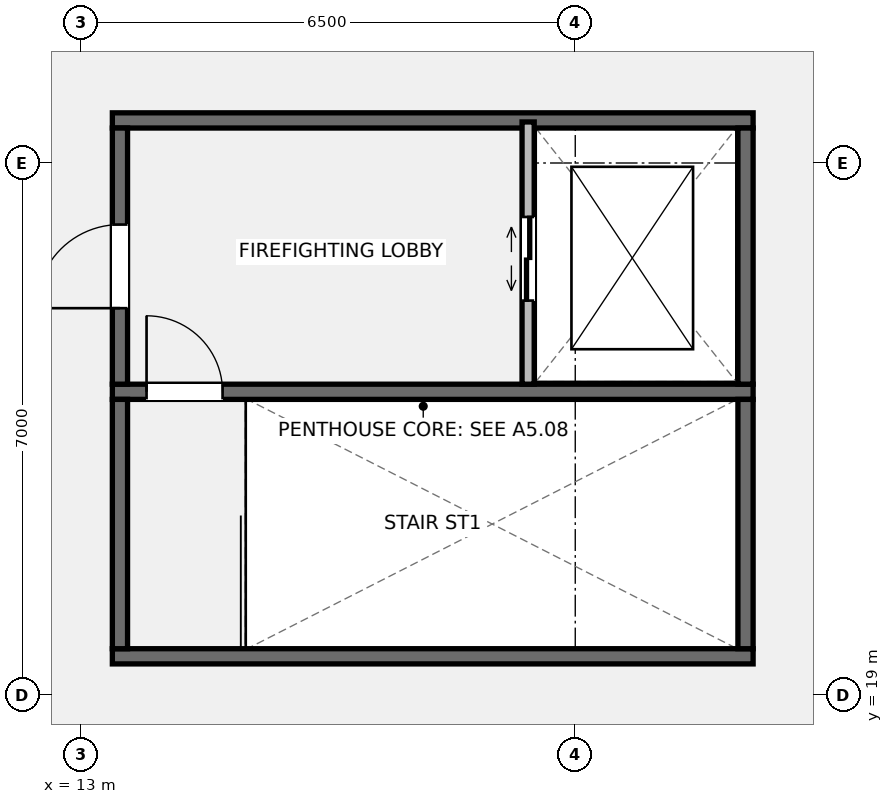
"""IFC4 building model, lengths in metres.
Left out: names, types, materials, properties, quantities, classifications, styles, units other than length and angle.
Written with IfcOpenShell. Run it as: python <this file> out.ifc"""

import sys

from ifc_helpers import new_model, si_unit, direction, frame, frame_2d, origin, place, context, subcontext, project, spatial, rectangle, extrude, element, fill, save


model = new_model("IFC4")
c1 = context("Model", 3, precision=1e-05, world=origin(), true_north=direction((0.0, 1.0)))
c2 = subcontext(c1, "Body", "Model", "MODEL_VIEW")
j1 = project(units=[si_unit("LENGTHUNIT", "METRE"), si_unit("PLANEANGLEUNIT", "RADIAN")], contexts=[c1])
p1 = place(None, origin())
s1 = spatial("IfcSite", under=j1, at=p1, CompositionType="ELEMENT")
p2 = place(p1, origin())
s2 = spatial("IfcBuilding", under=s1, at=p2, CompositionType="ELEMENT")
p3 = place(p2, frame((0.0, 0.0, 320.4)))
s3 = spatial("IfcBuildingStorey", under=s2, at=p3, CompositionType="ELEMENT", Elevation=320.4)
p4 = place(p3, frame((13.41, 19.51, 0.0), z_axis=(0.0, 0.0, 1.0), x_axis=(1.0, 0.0, 0.0)))
e1 = element("IfcWall", 1, at=p4, inside=s3, PredefinedType="SHEAR", context=c2, shape_type="SweptSolid", body=[
    extrude(rectangle(XDim=8.43, YDim=0.2, at=frame_2d((4.215, 0.0))), origin(), (0.0, 0.0, 1.0), 3.2),
])
p5 = place(p3, frame((13.41, 22.99, 0.0), z_axis=(0.0, 0.0, 1.0), x_axis=(1.0, 0.0, 0.0)))
e2 = element("IfcWall", 2, at=p5, inside=s3, PredefinedType="SHEAR", context=c2, shape_type="SweptSolid", body=[
    extrude(rectangle(XDim=8.43, YDim=0.2, at=frame_2d((4.215, 0.0))), origin(), (0.0, 0.0, 1.0), 3.2),
])
p6 = place(p5, frame((0.45, 0.0, 0.0)))
e3 = element("IfcOpeningElement", 3, at=p6, cuts=e2, PredefinedType="OPENING", context=c2, shape_type="SweptSolid", body=[
    extrude(rectangle(XDim=1.0, YDim=2.15, at=frame_2d((0.5, 1.075))), frame((0.0, 0.11, 0.0), z_axis=(0.0, -1.0, 0.0), x_axis=(1.0, 0.0, 0.0)), (0.0, 0.0, 1.0), 0.22),
])
for number, where, z_axis, x_axis in (
    (4, (13.51, 19.61, 0.0), (0.0, 0.0, 1.0), (0.0, 1.0, 0.0)),
    (5, (21.74, 19.61, 0.0), (0.0, 0.0, 1.0), (0.0, 1.0, 0.0)),
):
    element("IfcWall", number, at=place(p3, frame(where, z_axis=z_axis, x_axis=x_axis)), inside=s3, PredefinedType="SHEAR", context=c2, shape_type="SweptSolid", body=[
        extrude(rectangle(XDim=3.28, YDim=0.2, at=frame_2d((1.64, 0.0))), origin(), (0.0, 0.0, 1.0), 3.2),
    ])
p7 = place(p3, frame((13.41, 26.56, 0.0), z_axis=(0.0, 0.0, 1.0), x_axis=(1.0, 0.0, 0.0)))
e6 = element("IfcWall", 6, at=p7, inside=s3, PredefinedType="SHEAR", context=c2, shape_type="SweptSolid", body=[
    extrude(rectangle(XDim=8.43, YDim=0.2, at=frame_2d((4.215, 0.0))), origin(), (0.0, 0.0, 1.0), 3.2),
])
p8 = place(p3, frame((13.51, 23.09, 0.0), z_axis=(0.0, 0.0, 1.0), x_axis=(0.0, 1.0, 0.0)))
e7 = element("IfcWall", 7, at=p8, inside=s3, PredefinedType="SHEAR", context=c2, shape_type="SweptSolid", body=[
    extrude(rectangle(XDim=3.37, YDim=0.2, at=frame_2d((1.685, 0.0))), origin(), (0.0, 0.0, 1.0), 3.2),
])
p9 = place(p8, frame((1.0, 0.0, 0.0)))
e8 = element("IfcOpeningElement", 8, at=p9, cuts=e7, PredefinedType="OPENING", context=c2, shape_type="SweptSolid", body=[
    extrude(rectangle(XDim=1.1, YDim=2.2, at=frame_2d((0.55, 1.1))), frame((0.0, 0.11, 0.0), z_axis=(0.0, -1.0, 0.0), x_axis=(1.0, 0.0, 0.0)), (0.0, 0.0, 1.0), 0.22),
])
p10 = place(p3, frame((21.74, 23.09, 0.0), z_axis=(0.0, 0.0, 1.0), x_axis=(0.0, 1.0, 0.0)))
e9 = element("IfcWall", 9, at=p10, inside=s3, PredefinedType="SHEAR", context=c2, shape_type="SweptSolid", body=[
    extrude(rectangle(XDim=3.37, YDim=0.2, at=frame_2d((1.685, 0.0))), origin(), (0.0, 0.0, 1.0), 3.2),
])
p11 = place(p3, frame((18.88, 23.09, 0.0), z_axis=(0.0, 0.0, 1.0), x_axis=(0.0, 1.0, 0.0)))
e10 = element("IfcWall", 10, at=p11, inside=s3, PredefinedType="STANDARD", context=c2, shape_type="SweptSolid", body=[
    extrude(rectangle(XDim=3.45, YDim=0.16, at=frame_2d((1.725, 0.0))), origin(), (0.0, 0.0, 1.0), 3.16),
])
p12 = place(p11, frame((1.1, 0.0, 0.0)))
e11 = element("IfcOpeningElement", 11, at=p12, cuts=e10, PredefinedType="OPENING", context=c2, shape_type="SweptSolid", body=[
    extrude(rectangle(XDim=1.1, YDim=2.2, at=frame_2d((0.55, 1.1))), frame((0.0, 0.09, 0.0), z_axis=(0.0, -1.0, 0.0), x_axis=(1.0, 0.0, 0.0)), (0.0, 0.0, 1.0), 0.18),
])
p13 = place(p9, origin())
e12 = element("IfcDoor", 12, at=p13, inside=s3, OperationType="SINGLE_SWING_LEFT", PredefinedType="DOOR", context=c2, shape_type="SweptSolid", body=[
    extrude(rectangle(XDim=1.1, YDim=2.2, at=frame_2d((0.55, 1.1))), frame((0.0, 0.025, 0.0), z_axis=(0.0, -1.0, 0.0), x_axis=(1.0, 0.0, 0.0)), (0.0, 0.0, 1.0), 0.05),
])
fill(e8, e12)
p14 = place(p6, origin())
e13 = element("IfcDoor", 13, at=p14, inside=s3, OperationType="SINGLE_SWING_LEFT", PredefinedType="DOOR", context=c2, shape_type="SweptSolid", body=[
    extrude(rectangle(XDim=1.0, YDim=2.15, at=frame_2d((0.5, 1.075))), frame((0.0, 0.025, 0.0), z_axis=(0.0, -1.0, 0.0), x_axis=(1.0, 0.0, 0.0)), (0.0, 0.0, 1.0), 0.05),
])
fill(e3, e13)
p15 = place(p12, origin())
e14 = element("IfcDoor", 14, at=p15, inside=s3, OperationType="DOUBLE_DOOR_SLIDING", PredefinedType="DOOR", context=c2, shape_type="SweptSolid", body=[
    extrude(rectangle(XDim=1.1, YDim=2.2, at=frame_2d((0.55, 1.1))), frame((0.0, 0.025, 0.0), z_axis=(0.0, -1.0, 0.0), x_axis=(1.0, 0.0, 0.0)), (0.0, 0.0, 1.0), 0.05),
])
fill(e11, e14)
save(model, sys.argv[1])
